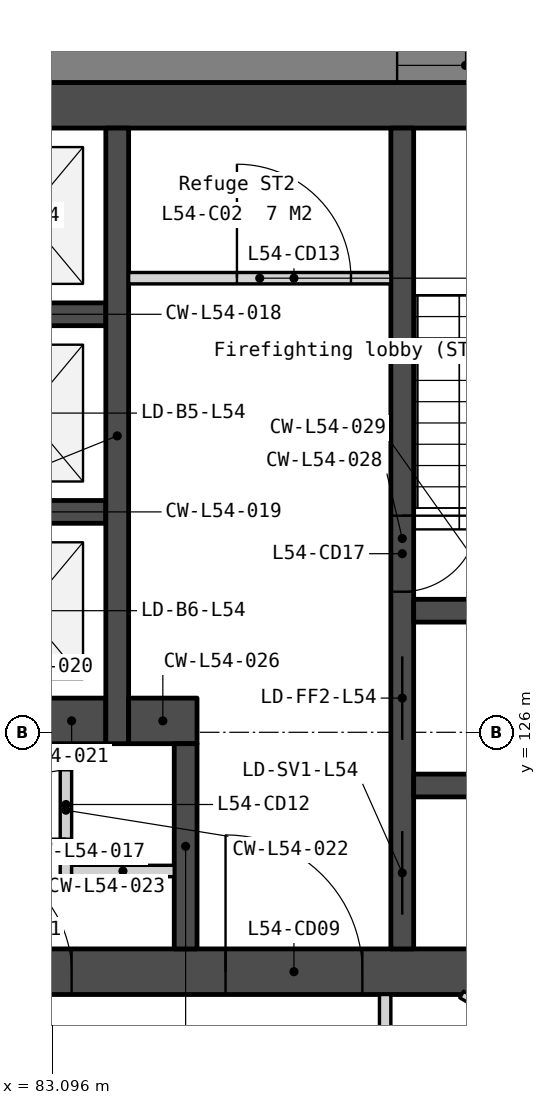
"""IFC4 building model, lengths in metres.
Left out: names, types, materials, properties, quantities, classifications, styles, units other than length and angle.
Written with IfcOpenShell. Run it as: python <this file> out.ifc"""

import sys

from ifc_helpers import new_model, si_unit, direction, frame, frame_2d, origin, place, context, subcontext, project, spatial, polyline, rectangle, outline, extrude, element, fill, save


model = new_model("IFC4")
c1 = context("Model", 3, precision=1e-05, world=origin(), true_north=direction((0.0, 1.0)))
c2 = subcontext(c1, "Body", "Model", "MODEL_VIEW")
j1 = project(units=[si_unit("LENGTHUNIT", "METRE"), si_unit("PLANEANGLEUNIT", "RADIAN")], contexts=[c1])
p1 = place(None, origin())
s1 = spatial("IfcSite", under=j1, at=p1, CompositionType="ELEMENT")
p2 = place(p1, origin())
s2 = spatial("IfcBuilding", under=s1, at=p2, CompositionType="ELEMENT")
p3 = place(p2, frame((0.0, 0.0, 215.3)))
s3 = spatial("IfcBuildingStorey", under=s2, at=p3, CompositionType="ELEMENT", Elevation=215.3)
p4 = place(p3, frame((69.0, 134.25, 0.0), z_axis=(0.0, 0.0, 1.0), x_axis=(1.0, 0.0, 0.0)))
e1 = element("IfcWall", 1, at=p4, inside=s3, PredefinedType="SOLIDWALL", context=c2, shape_type="SweptSolid", body=[
    extrude(rectangle(XDim=22.0, YDim=0.6, at=frame_2d((11.0, 0.0))), origin(), (0.0, 0.0, 1.0), 3.75),
])
p5 = place(p3, frame((69.0, 122.85, 0.0), z_axis=(0.0, 0.0, 1.0), x_axis=(1.0, 0.0, 0.0)))
e2 = element("IfcWall", 2, at=p5, inside=s3, PredefinedType="SOLIDWALL", context=c2, shape_type="SweptSolid", body=[
    extrude(rectangle(XDim=22.0, YDim=0.6, at=frame_2d((11.0, 0.0))), origin(), (0.0, 0.0, 1.0), 3.75),
])
p6 = place(p5, frame((16.375, 0.0, 0.0)))
e3 = element("IfcOpeningElement", 3, at=p6, cuts=e2, PredefinedType="OPENING", context=c2, shape_type="SweptSolid", body=[
    extrude(rectangle(XDim=1.8, YDim=2.1, at=frame_2d((0.9, 1.05))), frame((0.0, 0.31, 0.0), z_axis=(0.0, -1.0, 0.0), x_axis=(1.0, 0.0, 0.0)), (0.0, 0.0, 1.0), 0.62),
])
p7 = place(p5, frame((3.825, 0.0, 0.0)))
e4 = element("IfcOpeningElement", 4, at=p7, cuts=e2, PredefinedType="OPENING", context=c2, shape_type="SweptSolid", body=[
    extrude(rectangle(XDim=1.8, YDim=2.1, at=frame_2d((0.9, 1.05))), frame((0.0, 0.31, 0.0), z_axis=(0.0, -1.0, 0.0), x_axis=(1.0, 0.0, 0.0)), (0.0, 0.0, 1.0), 0.62),
])
p8 = place(p5, frame((12.85, 0.0, 0.0)))
e5 = element("IfcOpeningElement", 5, at=p8, cuts=e2, PredefinedType="OPENING", context=c2, shape_type="SweptSolid", body=[
    extrude(rectangle(XDim=1.5, YDim=2.1, at=frame_2d((0.75, 1.05))), frame((0.0, 0.31, 0.0), z_axis=(0.0, -1.0, 0.0), x_axis=(1.0, 0.0, 0.0)), (0.0, 0.0, 1.0), 0.62),
])
for number, where, z_axis, x_axis in (
    (6, (81.7, 131.5, 0.0), (0.0, 0.0, 1.0), (1.0, 0.0, 0.0)),
    (7, (81.7, 128.9, 0.0), (0.0, 0.0, 1.0), (1.0, 0.0, 0.0)),
):
    element("IfcWall", number, at=place(p3, frame(where, z_axis=z_axis, x_axis=x_axis)), inside=s3, PredefinedType="SOLIDWALL", context=c2, shape_type="SweptSolid", body=[
        extrude(rectangle(XDim=2.1, YDim=0.3, at=frame_2d((1.05, 0.0))), origin(), (0.0, 0.0, 1.0), 3.75),
    ])
p9 = place(p3, frame((82.9, 126.15, 0.0), z_axis=(0.0, 0.0, 1.0), x_axis=(1.0, 0.0, 0.0)))
e8 = element("IfcWall", 8, at=p9, inside=s3, PredefinedType="SOLIDWALL", context=c2, shape_type="SweptSolid", body=[
    extrude(rectangle(XDim=0.9, YDim=0.6, at=frame_2d((0.45, 0.0))), origin(), (0.0, 0.0, 1.0), 3.75),
])
p10 = place(p3, frame((83.275, 125.85, 0.0), z_axis=(0.0, 0.0, 1.0), x_axis=(0.0, -1.0, 0.0)))
e9 = element("IfcWall", 9, at=p10, inside=s3, PredefinedType="PARTITIONING", context=c2, shape_type="SweptSolid", body=[
    extrude(rectangle(XDim=1.75, YDim=0.15, at=frame_2d((0.875, 0.0))), origin(), (0.0, 0.0, 1.0), 3.75),
])
p11 = place(p10, frame((0.35, 0.0, 0.0)))
e10 = element("IfcOpeningElement", 10, at=p11, cuts=e9, PredefinedType="OPENING", context=c2, shape_type="SweptSolid", body=[
    extrude(rectangle(XDim=0.9, YDim=2.1, at=frame_2d((0.45, 1.05))), frame((0.0, 0.085, 0.0), z_axis=(0.0, -1.0, 0.0), x_axis=(1.0, 0.0, 0.0)), (0.0, 0.0, 1.0), 0.17),
])
p12 = place(p3, frame((83.35, 124.175, 0.0), z_axis=(0.0, 0.0, 1.0), x_axis=(1.0, 0.0, 0.0)))
e11 = element("IfcWall", 11, at=p12, inside=s3, PredefinedType="PARTITIONING", context=c2, shape_type="SweptSolid", body=[
    extrude(rectangle(XDim=1.35, YDim=0.15, at=frame_2d((0.675, 0.0))), origin(), (0.0, 0.0, 1.0), 3.75),
])
p13 = place(p3, frame((83.95, 133.95, 0.0), z_axis=(0.0, 0.0, 1.0), x_axis=(0.0, -1.0, 0.0)))
e12 = element("IfcWall", 12, at=p13, inside=s3, PredefinedType="SOLIDWALL", context=c2, shape_type="SweptSolid", body=[
    extrude(rectangle(XDim=8.1, YDim=0.3, at=frame_2d((4.05, 0.0))), origin(), (0.0, 0.0, 1.0), 3.75),
])
p14 = place(p3, frame((84.1, 131.975, 0.0), z_axis=(0.0, 0.0, 1.0), x_axis=(1.0, 0.0, 0.0)))
e13 = element("IfcWall", 13, at=p14, inside=s3, PredefinedType="PARTITIONING", context=c2, shape_type="SweptSolid", body=[
    extrude(rectangle(XDim=3.45, YDim=0.15, at=frame_2d((1.725, 0.0))), origin(), (0.0, 0.0, 1.0), 3.75),
])
p15 = place(p14, frame((1.425, 0.0, 0.0)))
e14 = element("IfcOpeningElement", 14, at=p15, cuts=e13, PredefinedType="OPENING", context=c2, shape_type="SweptSolid", body=[
    extrude(rectangle(XDim=1.5, YDim=2.1, at=frame_2d((0.75, 1.05))), frame((0.0, 0.085, 0.0), z_axis=(0.0, -1.0, 0.0), x_axis=(1.0, 0.0, 0.0)), (0.0, 0.0, 1.0), 0.17),
])
p16 = place(p3, frame((84.1, 126.15, 0.0), z_axis=(0.0, 0.0, 1.0), x_axis=(1.0, 0.0, 0.0)))
e15 = element("IfcWall", 15, at=p16, inside=s3, PredefinedType="SOLIDWALL", context=c2, shape_type="SweptSolid", body=[
    extrude(rectangle(XDim=0.9, YDim=0.6, at=frame_2d((0.45, 0.0))), origin(), (0.0, 0.0, 1.0), 3.75),
])
p17 = place(p3, frame((84.85, 125.85, 0.0), z_axis=(0.0, 0.0, 1.0), x_axis=(0.0, -1.0, 0.0)))
e16 = element("IfcWall", 16, at=p17, inside=s3, PredefinedType="SOLIDWALL", context=c2, shape_type="SweptSolid", body=[
    extrude(rectangle(XDim=2.7, YDim=0.3, at=frame_2d((1.35, 0.0))), origin(), (0.0, 0.0, 1.0), 3.75),
])
p18 = place(p3, frame((87.7, 133.95, 0.0), z_axis=(0.0, 0.0, 1.0), x_axis=(0.0, -1.0, 0.0)))
e17 = element("IfcWall", 17, at=p18, inside=s3, PredefinedType="SOLIDWALL", context=c2, shape_type="SweptSolid", body=[
    extrude(rectangle(XDim=10.8, YDim=0.3, at=frame_2d((5.4, 0.0))), origin(), (0.0, 0.0, 1.0), 3.75),
])
p19 = place(p18, frame((6.95, 0.0, 0.0)))
e18 = element("IfcOpeningElement", 18, at=p19, cuts=e17, PredefinedType="OPENING", context=c2, shape_type="SweptSolid", body=[
    extrude(rectangle(XDim=1.1, YDim=2.1, at=frame_2d((0.55, 1.05))), frame((0.0, 0.16, 0.0), z_axis=(0.0, -1.0, 0.0), x_axis=(1.0, 0.0, 0.0)), (0.0, 0.0, 1.0), 0.32),
])
p20 = place(p18, frame((5.1, 0.0, 0.0)))
e19 = element("IfcOpeningElement", 19, at=p20, cuts=e17, PredefinedType="OPENING", context=c2, shape_type="SweptSolid", body=[
    extrude(rectangle(XDim=1.0, YDim=2.1, at=frame_2d((0.5, 1.05))), frame((0.0, 0.16, 0.0), z_axis=(0.0, -1.0, 0.0), x_axis=(1.0, 0.0, 0.0)), (0.0, 0.0, 1.0), 0.32),
])
p21 = place(p18, frame((9.25, 0.0, 0.0)))
e20 = element("IfcOpeningElement", 20, at=p21, cuts=e17, PredefinedType="OPENING", context=c2, shape_type="SweptSolid", body=[
    extrude(rectangle(XDim=1.1, YDim=2.1, at=frame_2d((0.55, 1.05))), frame((0.0, 0.16, 0.0), z_axis=(0.0, -1.0, 0.0), x_axis=(1.0, 0.0, 0.0)), (0.0, 0.0, 1.0), 0.32),
])
for number, where, z_axis, x_axis in (
    (21, (87.85, 127.6, 0.0), (0.0, 0.0, 1.0), (1.0, 0.0, 0.0)),
    (22, (87.85, 125.3, 0.0), (0.0, 0.0, 1.0), (1.0, 0.0, 0.0)),
):
    element("IfcWall", number, at=place(p3, frame(where, z_axis=z_axis, x_axis=x_axis)), inside=s3, PredefinedType="SOLIDWALL", context=c2, shape_type="SweptSolid", body=[
        extrude(rectangle(XDim=2.55, YDim=0.3, at=frame_2d((1.275, 0.0))), origin(), (0.0, 0.0, 1.0), 3.75),
    ])
p22 = place(p3, frame((99.365, 134.775, -0.15), z_axis=(0.0, 0.0, 1.0), x_axis=(-1.0, 0.0, 0.0)))
e23 = element("IfcWall", 23, at=p22, inside=s3, PredefinedType="SOLIDWALL", context=c2, shape_type="SweptSolid", body=[
    extrude(outline(polyline([(38.729, 0.0), (38.729, 3.9), (0.0, 3.9), (0.0, 0.0), (38.729, 0.0)])), frame((0.0, 0.225, 0.0), z_axis=(0.0, -1.0, 0.0), x_axis=(1.0, 0.0, 0.0)), (0.0, 0.0, 1.0), 0.45),
])
p23 = place(p22, frame((0.776, 0.0, 0.95)))
e24 = element("IfcOpeningElement", 24, at=p23, cuts=e23, PredefinedType="OPENING", context=c2, shape_type="SweptSolid", body=[
    extrude(rectangle(XDim=1.2, YDim=2.2, at=frame_2d((0.6, 1.1))), frame((0.0, 0.235, 0.0), z_axis=(0.0, -1.0, 0.0), x_axis=(1.0, 0.0, 0.0)), (0.0, 0.0, 1.0), 0.47),
])
p24 = place(p22, frame((7.632, 0.0, 0.95)))
e25 = element("IfcOpeningElement", 25, at=p24, cuts=e23, PredefinedType="OPENING", context=c2, shape_type="SweptSolid", body=[
    extrude(rectangle(XDim=1.8, YDim=2.2, at=frame_2d((0.9, 1.1))), frame((0.0, 0.235, 0.0), z_axis=(0.0, -1.0, 0.0), x_axis=(1.0, 0.0, 0.0)), (0.0, 0.0, 1.0), 0.47),
])
p25 = place(p22, frame((9.932, 0.0, 0.95)))
e26 = element("IfcOpeningElement", 26, at=p25, cuts=e23, PredefinedType="OPENING", context=c2, shape_type="SweptSolid", body=[
    extrude(rectangle(XDim=1.8, YDim=2.2, at=frame_2d((0.9, 1.1))), frame((0.0, 0.235, 0.0), z_axis=(0.0, -1.0, 0.0), x_axis=(1.0, 0.0, 0.0)), (0.0, 0.0, 1.0), 0.47),
])
p26 = place(p22, frame((17.315, 0.0, 0.95)))
e27 = element("IfcOpeningElement", 27, at=p26, cuts=e23, PredefinedType="OPENING", context=c2, shape_type="SweptSolid", body=[
    extrude(rectangle(XDim=1.8, YDim=2.2, at=frame_2d((0.9, 1.1))), frame((0.0, 0.235, 0.0), z_axis=(0.0, -1.0, 0.0), x_axis=(1.0, 0.0, 0.0)), (0.0, 0.0, 1.0), 0.47),
])
p27 = place(p22, frame((19.615, 0.0, 0.95)))
e28 = element("IfcOpeningElement", 28, at=p27, cuts=e23, PredefinedType="OPENING", context=c2, shape_type="SweptSolid", body=[
    extrude(rectangle(XDim=1.8, YDim=2.2, at=frame_2d((0.9, 1.1))), frame((0.0, 0.235, 0.0), z_axis=(0.0, -1.0, 0.0), x_axis=(1.0, 0.0, 0.0)), (0.0, 0.0, 1.0), 0.47),
])
p28 = place(p22, frame((26.997, 0.0, 0.95)))
e29 = element("IfcOpeningElement", 29, at=p28, cuts=e23, PredefinedType="OPENING", context=c2, shape_type="SweptSolid", body=[
    extrude(rectangle(XDim=1.8, YDim=2.2, at=frame_2d((0.9, 1.1))), frame((0.0, 0.235, 0.0), z_axis=(0.0, -1.0, 0.0), x_axis=(1.0, 0.0, 0.0)), (0.0, 0.0, 1.0), 0.47),
])
p29 = place(p22, frame((29.297, 0.0, 0.95)))
e30 = element("IfcOpeningElement", 30, at=p29, cuts=e23, PredefinedType="OPENING", context=c2, shape_type="SweptSolid", body=[
    extrude(rectangle(XDim=1.8, YDim=2.2, at=frame_2d((0.9, 1.1))), frame((0.0, 0.235, 0.0), z_axis=(0.0, -1.0, 0.0), x_axis=(1.0, 0.0, 0.0)), (0.0, 0.0, 1.0), 0.47),
])
p30 = place(p22, frame((36.753, 0.0, 0.95)))
e31 = element("IfcOpeningElement", 31, at=p30, cuts=e23, PredefinedType="OPENING", context=c2, shape_type="SweptSolid", body=[
    extrude(rectangle(XDim=1.2, YDim=2.2, at=frame_2d((0.6, 1.1))), frame((0.0, 0.235, 0.0), z_axis=(0.0, -1.0, 0.0), x_axis=(1.0, 0.0, 0.0)), (0.0, 0.0, 1.0), 0.47),
])
p31 = place(p3, frame((87.296, 108.658, -0.15), z_axis=(0.0, 0.0, 1.0), x_axis=(0.500003227337, 0.866023540472, 0.0)))
e32 = element("IfcWall", 32, at=p31, inside=s3, PredefinedType="SOLIDWALL", context=c2, shape_type="SweptSolid", body=[
    extrude(outline(polyline([(27.147, 3.9), (27.147, 0.0), (0.0, 0.0), (0.0, 3.9), (27.147, 3.9)])), frame((0.0, 0.225, 0.0), z_axis=(0.0, -1.0, 0.0), x_axis=(1.0, 0.0, 0.0)), (0.0, 0.0, 1.0), 0.45),
])
p32 = place(p31, frame((5.732, 0.0, 0.95)))
e33 = element("IfcOpeningElement", 33, at=p32, cuts=e32, PredefinedType="OPENING", context=c2, shape_type="SweptSolid", body=[
    extrude(rectangle(XDim=1.8, YDim=2.2, at=frame_2d((0.9, 1.1))), frame((0.0, 0.235, 0.0), z_axis=(0.0, -1.0, 0.0), x_axis=(1.0, 0.0, 0.0)), (0.0, 0.0, 1.0), 0.47),
])
p33 = place(p31, frame((8.032, 0.0, 0.95)))
e34 = element("IfcOpeningElement", 34, at=p33, cuts=e32, PredefinedType="OPENING", context=c2, shape_type="SweptSolid", body=[
    extrude(rectangle(XDim=1.8, YDim=2.2, at=frame_2d((0.9, 1.1))), frame((0.0, 0.235, 0.0), z_axis=(0.0, -1.0, 0.0), x_axis=(1.0, 0.0, 0.0)), (0.0, 0.0, 1.0), 0.47),
])
p34 = place(p31, frame((15.415, 0.0, 0.95)))
e35 = element("IfcOpeningElement", 35, at=p34, cuts=e32, PredefinedType="OPENING", context=c2, shape_type="SweptSolid", body=[
    extrude(rectangle(XDim=1.8, YDim=2.2, at=frame_2d((0.9, 1.1))), frame((0.0, 0.235, 0.0), z_axis=(0.0, -1.0, 0.0), x_axis=(1.0, 0.0, 0.0)), (0.0, 0.0, 1.0), 0.47),
])
p35 = place(p31, frame((17.715, 0.0, 0.95)))
e36 = element("IfcOpeningElement", 36, at=p35, cuts=e32, PredefinedType="OPENING", context=c2, shape_type="SweptSolid", body=[
    extrude(rectangle(XDim=1.8, YDim=2.2, at=frame_2d((0.9, 1.1))), frame((0.0, 0.235, 0.0), z_axis=(0.0, -1.0, 0.0), x_axis=(1.0, 0.0, 0.0)), (0.0, 0.0, 1.0), 0.47),
])
p36 = place(p31, frame((25.171, 0.0, 0.95)))
e37 = element("IfcOpeningElement", 37, at=p36, cuts=e32, PredefinedType="OPENING", context=c2, shape_type="SweptSolid", body=[
    extrude(rectangle(XDim=1.2, YDim=2.2, at=frame_2d((0.6, 1.1))), frame((0.0, 0.235, 0.0), z_axis=(0.0, -1.0, 0.0), x_axis=(1.0, 0.0, 0.0)), (0.0, 0.0, 1.0), 0.47),
])
p37 = place(p3, frame((88.482, 122.55, 0.0), z_axis=(0.0, 0.0, 1.0), x_axis=(0.866023511746, -0.500003277092, 0.0)))
e38 = element("IfcWall", 38, at=p37, inside=s3, PredefinedType="PARTITIONING", context=c2, shape_type="SweptSolid", body=[
    extrude(rectangle(XDim=5.694, YDim=0.1, at=frame_2d((2.847, 0.0))), origin(), (0.0, 0.0, 1.0), 3.75),
])
p38 = place(p37, frame((2.397, 0.0, 0.0)))
e39 = element("IfcOpeningElement", 39, at=p38, cuts=e38, PredefinedType="OPENING", context=c2, shape_type="SweptSolid", body=[
    extrude(rectangle(XDim=0.9, YDim=2.1, at=frame_2d((0.45, 1.05))), frame((0.0, 0.06, 0.0), z_axis=(0.0, -1.0, 0.0), x_axis=(1.0, 0.0, 0.0)), (0.0, 0.0, 1.0), 0.12),
])
p39 = place(p3, frame((87.475, 120.025, 0.0), z_axis=(0.0, 0.0, 1.0), x_axis=(9.6683747e-05, 0.999999995326, 0.0)))
e40 = element("IfcWall", 40, at=p39, inside=s3, PredefinedType="PARTITIONING", context=c2, shape_type="SweptSolid", body=[
    extrude(rectangle(XDim=2.525, YDim=0.15, at=frame_2d((1.263, 0.0))), origin(), (0.0, 0.0, 1.0), 3.75),
])
p40 = place(p19, origin())
e41 = element("IfcDoor", 41, at=p40, inside=s3, OperationType="SLIDING_TO_LEFT", PredefinedType="DOOR", context=c2, shape_type="SweptSolid", body=[
    extrude(rectangle(XDim=1.1, YDim=2.1, at=frame_2d((0.55, 1.05))), frame((0.0, 0.025, 0.0), z_axis=(0.0, -1.0, 0.0), x_axis=(1.0, 0.0, 0.0)), (0.0, 0.0, 1.0), 0.05),
])
fill(e18, e41)
p41 = place(p6, origin())
e42 = element("IfcDoor", 42, at=p41, inside=s3, OperationType="DOUBLE_DOOR_DOUBLE_SWING", PredefinedType="DOOR", context=c2, shape_type="SweptSolid", body=[
    extrude(rectangle(XDim=1.8, YDim=2.1, at=frame_2d((0.9, 1.05))), frame((0.0, 0.025, 0.0), z_axis=(0.0, -1.0, 0.0), x_axis=(1.0, 0.0, 0.0)), (0.0, 0.0, 1.0), 0.05),
])
fill(e3, e42)
p42 = place(p8, origin())
e43 = element("IfcDoor", 43, at=p42, inside=s3, OperationType="DOUBLE_DOOR_DOUBLE_SWING", PredefinedType="DOOR", context=c2, shape_type="SweptSolid", body=[
    extrude(rectangle(XDim=1.5, YDim=2.1, at=frame_2d((0.75, 1.05))), frame((0.0, 0.025, 0.0), z_axis=(0.0, -1.0, 0.0), x_axis=(1.0, 0.0, 0.0)), (0.0, 0.0, 1.0), 0.05),
])
fill(e5, e43)
p43 = place(p11, origin())
e44 = element("IfcDoor", 44, at=p43, inside=s3, OperationType="SINGLE_SWING_RIGHT", PredefinedType="DOOR", context=c2, shape_type="SweptSolid", body=[
    extrude(rectangle(XDim=0.9, YDim=2.1, at=frame_2d((0.45, 1.05))), frame((0.0, 0.025, 0.0), z_axis=(0.0, -1.0, 0.0), x_axis=(1.0, 0.0, 0.0)), (0.0, 0.0, 1.0), 0.05),
])
fill(e10, e44)
p44 = place(p15, origin())
e45 = element("IfcDoor", 45, at=p44, inside=s3, OperationType="DOUBLE_DOOR_DOUBLE_SWING", PredefinedType="DOOR", context=c2, shape_type="SweptSolid", body=[
    extrude(rectangle(XDim=1.5, YDim=2.1, at=frame_2d((0.75, 1.05))), frame((0.0, 0.025, 0.0), z_axis=(0.0, -1.0, 0.0), x_axis=(1.0, 0.0, 0.0)), (0.0, 0.0, 1.0), 0.05),
])
fill(e14, e45)
p45 = place(p20, origin())
e46 = element("IfcDoor", 46, at=p45, inside=s3, OperationType="SINGLE_SWING_LEFT", PredefinedType="DOOR", context=c2, shape_type="SweptSolid", body=[
    extrude(rectangle(XDim=1.0, YDim=2.1, at=frame_2d((0.5, 1.05))), frame((0.0, 0.025, 0.0), z_axis=(0.0, -1.0, 0.0), x_axis=(1.0, 0.0, 0.0)), (0.0, 0.0, 1.0), 0.05),
])
fill(e19, e46)
p46 = place(p21, origin())
e47 = element("IfcDoor", 47, at=p46, inside=s3, OperationType="SLIDING_TO_LEFT", PredefinedType="DOOR", context=c2, shape_type="SweptSolid", body=[
    extrude(rectangle(XDim=1.1, YDim=2.1, at=frame_2d((0.55, 1.05))), frame((0.0, 0.025, 0.0), z_axis=(0.0, -1.0, 0.0), x_axis=(1.0, 0.0, 0.0)), (0.0, 0.0, 1.0), 0.05),
])
fill(e20, e47)
p47 = place(p25, origin())
e48 = element("IfcWindow", 48, at=p47, inside=s3, PartitioningType="SINGLE_PANEL", PredefinedType="WINDOW", context=c2, shape_type="SweptSolid", body=[
    extrude(rectangle(XDim=1.8, YDim=2.2, at=frame_2d((0.9, 1.1))), frame((0.0, 0.03, 0.0), z_axis=(0.0, -1.0, 0.0), x_axis=(1.0, 0.0, 0.0)), (0.0, 0.0, 1.0), 0.06),
])
fill(e26, e48)
save(model, sys.argv[1])
